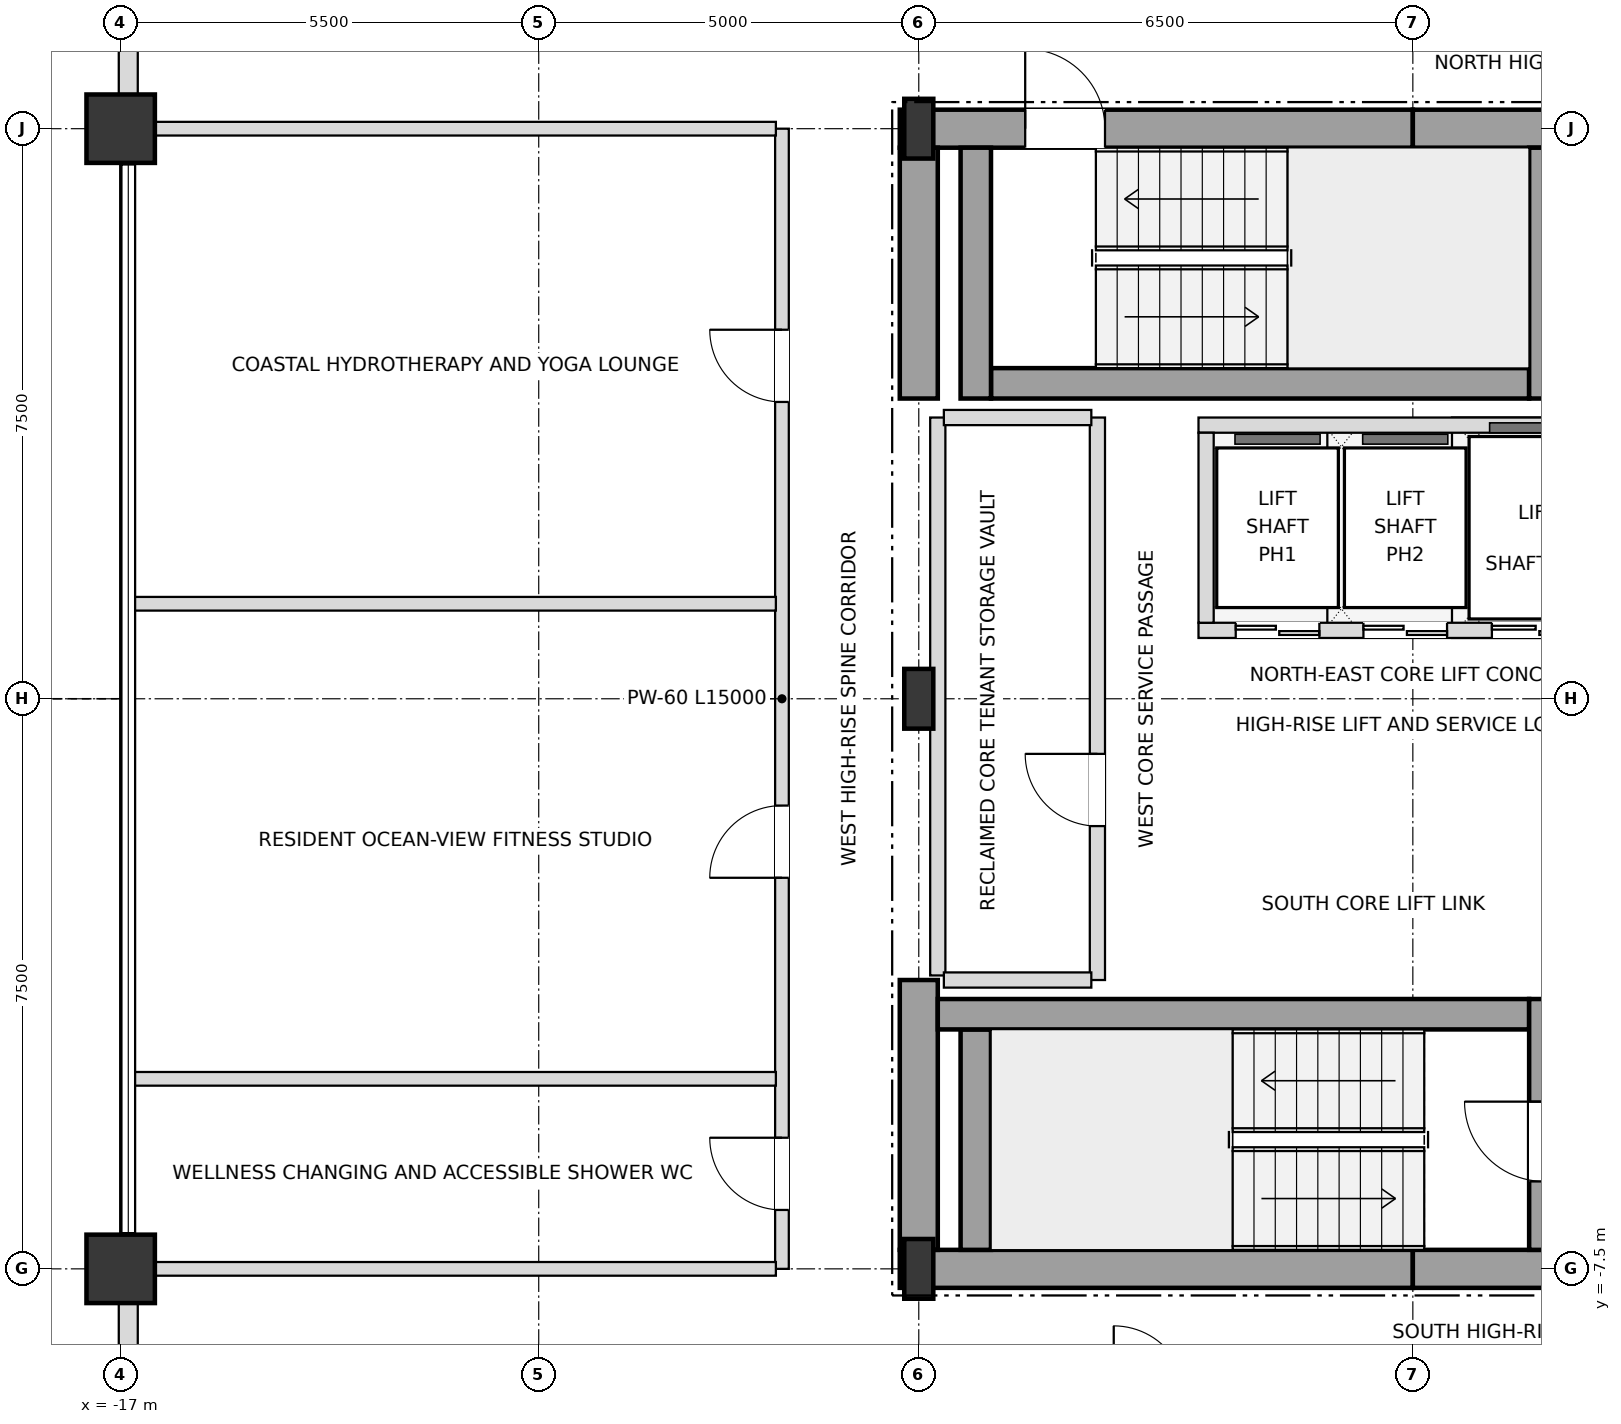
"""IFC4 building model, lengths in metres.
Left out: names, types, materials, properties, quantities, classifications, styles, units other than length and angle.
Written with IfcOpenShell. Run it as: python <this file> out.ifc"""

import sys

from ifc_helpers import new_model, si_unit, direction, frame, frame_2d, origin, origin_2d, place, context, subcontext, project, spatial, rectangle, i_section, extrude, element, fill, save


model = new_model("IFC4")
c1 = context("Model", 3, precision=1e-05, world=origin(), true_north=direction((0.0, 1.0)))
c2 = subcontext(c1, "Body", "Model", "MODEL_VIEW")
j1 = project(units=[si_unit("LENGTHUNIT", "METRE"), si_unit("PLANEANGLEUNIT", "RADIAN")], contexts=[c1])
p1 = place(None, origin())
s1 = spatial("IfcSite", under=j1, at=p1, CompositionType="ELEMENT")
p2 = place(p1, origin())
s2 = spatial("IfcBuilding", under=s1, at=p2, CompositionType="ELEMENT")
p3 = place(p2, frame((0.0, 0.0, 283.5)))
s3 = spatial("IfcBuildingStorey", under=s2, at=p3, CompositionType="ELEMENT", Elevation=283.5)
for number, where, z_axis, x_axis in (
    (1, (-6.5, -7.5, 0.0), (0.0, 0.0, 1.0), (1.0, 0.0, 0.0)),
    (2, (-6.5, 0.0, 0.0), (0.0, 0.0, 1.0), (1.0, 0.0, 0.0)),
    (3, (-6.5, 7.5, 0.0), (0.0, 0.0, 1.0), (1.0, 0.0, 0.0)),
):
    element("IfcColumn", number, at=place(p3, frame(where, z_axis=z_axis, x_axis=x_axis)), inside=s3, PredefinedType="COLUMN", context=c2, shape_type="SweptSolid", body=[
        extrude(i_section(OverallWidth=0.382, OverallDepth=0.786, WebThickness=0.02, FlangeThickness=0.033, at=origin_2d()), origin(), (0.0, 0.0, 1.0), 3.6),
    ])
for number, where, z_axis, x_axis in (
    (4, (-17.0, 7.5, 0.0), (0.0, 0.0, 1.0), (1.0, 0.0, 0.0)),
    (5, (-17.0, -7.5, 0.0), (0.0, 0.0, 1.0), (1.0, 0.0, 0.0)),
):
    element("IfcColumn", number, at=place(p3, frame(where, z_axis=z_axis, x_axis=x_axis)), inside=s3, PredefinedType="USERDEFINED", context=c2, shape_type="SweptSolid", body=[
        extrude(rectangle(XDim=0.9, YDim=0.9, at=origin_2d()), origin(), (0.0, 0.0, 1.0), 3.6),
    ])
p4 = place(p3, frame((-16.9, 12.555, 0.0), z_axis=(0.0, 0.0, 1.0), x_axis=(0.0, -1.0, 0.0)))
e6 = element("IfcWall", 6, at=p4, inside=s3, PredefinedType="SOLIDWALL", context=c2, shape_type="SweptSolid", body=[
    extrude(rectangle(XDim=4.61, YDim=0.25, at=frame_2d((2.305, 0.0))), origin(), (0.0, 0.0, 1.0), 2.748),
])
p5 = place(p4, frame((1.405, 0.0, 0.72)))
e7 = element("IfcOpeningElement", 7, at=p5, cuts=e6, PredefinedType="OPENING", context=c2, shape_type="SweptSolid", body=[
    extrude(rectangle(XDim=1.8, YDim=1.68, at=frame_2d((0.9, 0.84))), frame((0.0, 0.135, 0.0), z_axis=(0.0, -1.0, 0.0), x_axis=(1.0, 0.0, 0.0)), (0.0, 0.0, 1.0), 0.27),
])
p6 = place(p3, frame((-16.9, -7.945, 0.0), z_axis=(0.0, 0.0, 1.0), x_axis=(0.0, -1.0, 0.0)))
e8 = element("IfcWall", 8, at=p6, inside=s3, PredefinedType="SOLIDWALL", context=c2, shape_type="SweptSolid", body=[
    extrude(rectangle(XDim=4.61, YDim=0.25, at=frame_2d((2.305, 0.0))), origin(), (0.0, 0.0, 1.0), 2.748),
])
p7 = place(p6, frame((1.405, 0.0, 0.72)))
e9 = element("IfcOpeningElement", 9, at=p7, cuts=e8, PredefinedType="OPENING", context=c2, shape_type="SweptSolid", body=[
    extrude(rectangle(XDim=1.8, YDim=1.68, at=frame_2d((0.9, 0.84))), frame((0.0, 0.135, 0.0), z_axis=(0.0, -1.0, 0.0), x_axis=(1.0, 0.0, 0.0)), (0.0, 0.0, 1.0), 0.27),
])
for number, where, z_axis, x_axis in (
    (10, (-6.75, -7.5, 0.0), (0.0, 0.0, 1.0), (1.0, 0.0, 0.0)),
    (11, (0.0, -7.5, 0.0), (0.0, 0.0, 1.0), (1.0, 0.0, 0.0)),
):
    element("IfcWall", number, at=place(p3, frame(where, z_axis=z_axis, x_axis=x_axis)), inside=s3, PredefinedType="SHEAR", context=c2, shape_type="SweptSolid", body=[
        extrude(rectangle(XDim=6.75, YDim=0.5, at=frame_2d((3.375, 0.0))), origin(), (0.0, 0.0, 1.0), 3.38),
    ])
p8 = place(p3, frame((-6.75, 7.5, 0.0), z_axis=(0.0, 0.0, 1.0), x_axis=(1.0, 0.0, 0.0)))
e12 = element("IfcWall", 12, at=p8, inside=s3, PredefinedType="SHEAR", context=c2, shape_type="SweptSolid", body=[
    extrude(rectangle(XDim=6.75, YDim=0.5, at=frame_2d((3.375, 0.0))), origin(), (0.0, 0.0, 1.0), 3.38),
])
p9 = place(p8, frame((1.65, 0.0, 0.0)))
e13 = element("IfcOpeningElement", 13, at=p9, cuts=e12, PredefinedType="OPENING", context=c2, shape_type="SweptSolid", body=[
    extrude(rectangle(XDim=1.05, YDim=2.15, at=frame_2d((0.525, 1.075))), frame((0.0, 0.26, 0.0), z_axis=(0.0, -1.0, 0.0), x_axis=(1.0, 0.0, 0.0)), (0.0, 0.0, 1.0), 0.52),
])
p10 = place(p3, frame((0.0, 7.5, 0.0), z_axis=(0.0, 0.0, 1.0), x_axis=(1.0, 0.0, 0.0)))
e14 = element("IfcWall", 14, at=p10, inside=s3, PredefinedType="SHEAR", context=c2, shape_type="SweptSolid", body=[
    extrude(rectangle(XDim=2.08, YDim=0.5, at=frame_2d((1.04, 0.0))), origin(), (0.0, 0.0, 1.0), 3.38),
])
p11 = place(p3, frame((-6.5, -7.25, 0.0), z_axis=(0.0, 0.0, 1.0), x_axis=(0.0, 1.0, 0.0)))
e15 = element("IfcWall", 15, at=p11, inside=s3, PredefinedType="SHEAR", context=c2, shape_type="SweptSolid", body=[
    extrude(rectangle(XDim=3.55, YDim=0.5, at=frame_2d((1.775, 0.0))), origin(), (0.0, 0.0, 1.0), 3.38),
])
p12 = place(p3, frame((-6.5, 3.95, 0.0), z_axis=(0.0, 0.0, 1.0), x_axis=(0.0, 1.0, 0.0)))
e16 = element("IfcWall", 16, at=p12, inside=s3, PredefinedType="SHEAR", context=c2, shape_type="SweptSolid", body=[
    extrude(rectangle(XDim=3.3, YDim=0.5, at=frame_2d((1.65, 0.0))), origin(), (0.0, 0.0, 1.0), 3.38),
])
p13 = place(p3, frame((-5.75, -7.25, 0.0), z_axis=(0.0, 0.0, 1.0), x_axis=(0.0, 1.0, 0.0)))
e17 = element("IfcWall", 17, at=p13, inside=s3, PredefinedType="SHEAR", context=c2, shape_type="SweptSolid", body=[
    extrude(rectangle(XDim=2.9, YDim=0.4, at=frame_2d((1.45, 0.0))), origin(), (0.0, 0.0, 1.0), 3.38),
])
p14 = place(p3, frame((-6.25, -4.15, 0.0), z_axis=(0.0, 0.0, 1.0), x_axis=(1.0, 0.0, 0.0)))
e18 = element("IfcWall", 18, at=p14, inside=s3, PredefinedType="SHEAR", context=c2, shape_type="SweptSolid", body=[
    extrude(rectangle(XDim=7.78, YDim=0.4, at=frame_2d((3.89, 0.0))), origin(), (0.0, 0.0, 1.0), 3.38),
])
p15 = place(p3, frame((1.73, -7.25, 0.0), z_axis=(0.0, 0.0, 1.0), x_axis=(0.0, 1.0, 0.0)))
e19 = element("IfcWall", 19, at=p15, inside=s3, PredefinedType="SHEAR", context=c2, shape_type="SweptSolid", body=[
    extrude(rectangle(XDim=3.3, YDim=0.4, at=frame_2d((1.65, 0.0))), origin(), (0.0, 0.0, 1.0), 3.38),
])
p16 = place(p15, frame((0.9, 0.0, 0.0)))
e20 = element("IfcOpeningElement", 20, at=p16, cuts=e19, PredefinedType="OPENING", context=c2, shape_type="SweptSolid", body=[
    extrude(rectangle(XDim=1.05, YDim=2.15, at=frame_2d((0.525, 1.075))), frame((0.0, 0.21, 0.0), z_axis=(0.0, -1.0, 0.0), x_axis=(1.0, 0.0, 0.0)), (0.0, 0.0, 1.0), 0.42),
])
p17 = place(p3, frame((-5.55, 4.15, 0.0), z_axis=(0.0, 0.0, 1.0), x_axis=(1.0, 0.0, 0.0)))
e21 = element("IfcWall", 21, at=p17, inside=s3, PredefinedType="SHEAR", context=c2, shape_type="SweptSolid", body=[
    extrude(rectangle(XDim=7.08, YDim=0.4, at=frame_2d((3.54, 0.0))), origin(), (0.0, 0.0, 1.0), 3.38),
])
for number, where, z_axis, x_axis in (
    (22, (1.73, 3.95, 0.0), (0.0, 0.0, 1.0), (0.0, 1.0, 0.0)),
    (23, (-5.75, 3.95, 0.0), (0.0, 0.0, 1.0), (0.0, 1.0, 0.0)),
):
    element("IfcWall", number, at=place(p3, frame(where, z_axis=z_axis, x_axis=x_axis)), inside=s3, PredefinedType="SHEAR", context=c2, shape_type="SweptSolid", body=[
        extrude(rectangle(XDim=3.3, YDim=0.4, at=frame_2d((1.65, 0.0))), origin(), (0.0, 0.0, 1.0), 3.38),
    ])
p18 = place(p3, frame((-2.82, 0.9, 0.0), z_axis=(0.0, 0.0, 1.0), x_axis=(1.0, 0.0, 0.0)))
e24 = element("IfcWall", 24, at=p18, inside=s3, PredefinedType="SOLIDWALL", context=c2, shape_type="SweptSolid", body=[
    extrude(rectangle(XDim=5.58, YDim=0.2, at=frame_2d((2.79, 0.0))), origin(), (0.0, 0.0, 1.0), 3.38),
])
p19 = place(p18, frame((0.49, 0.0, 0.0)))
e25 = element("IfcOpeningElement", 25, at=p19, cuts=e24, PredefinedType="OPENING", context=c2, shape_type="SweptSolid", body=[
    extrude(rectangle(XDim=1.1, YDim=2.15, at=frame_2d((0.55, 1.075))), frame((0.0, 0.11, 0.0), z_axis=(0.0, -1.0, 0.0), x_axis=(1.0, 0.0, 0.0)), (0.0, 0.0, 1.0), 0.22),
])
p20 = place(p18, frame((2.17, 0.0, 0.0)))
e26 = element("IfcOpeningElement", 26, at=p20, cuts=e24, PredefinedType="OPENING", context=c2, shape_type="SweptSolid", body=[
    extrude(rectangle(XDim=1.1, YDim=2.15, at=frame_2d((0.55, 1.075))), frame((0.0, 0.11, 0.0), z_axis=(0.0, -1.0, 0.0), x_axis=(1.0, 0.0, 0.0)), (0.0, 0.0, 1.0), 0.22),
])
p21 = place(p18, frame((3.86, 0.0, 0.0)))
e27 = element("IfcOpeningElement", 27, at=p21, cuts=e24, PredefinedType="OPENING", context=c2, shape_type="SweptSolid", body=[
    extrude(rectangle(XDim=1.2, YDim=2.2, at=frame_2d((0.6, 1.1))), frame((0.0, 0.11, 0.0), z_axis=(0.0, -1.0, 0.0), x_axis=(1.0, 0.0, 0.0)), (0.0, 0.0, 1.0), 0.22),
])
p22 = place(p3, frame((-2.82, 3.6, 0.0), z_axis=(0.0, 0.0, 1.0), x_axis=(1.0, 0.0, 0.0)))
e28 = element("IfcWall", 28, at=p22, inside=s3, PredefinedType="SOLIDWALL", context=c2, shape_type="SweptSolid", body=[
    extrude(rectangle(XDim=5.58, YDim=0.2, at=frame_2d((2.79, 0.0))), origin(), (0.0, 0.0, 1.0), 3.38),
])
p23 = place(p3, frame((-2.72, 1.0, 0.0), z_axis=(0.0, 0.0, 1.0), x_axis=(0.0, 1.0, 0.0)))
e29 = element("IfcWall", 29, at=p23, inside=s3, PredefinedType="SOLIDWALL", context=c2, shape_type="SweptSolid", body=[
    extrude(rectangle(XDim=2.5, YDim=0.2, at=frame_2d((1.25, 0.0))), origin(), (0.0, 0.0, 1.0), 3.38),
])
p24 = place(p3, frame((-8.3, -7.5, 0.0), z_axis=(0.0, 0.0, 1.0), x_axis=(0.0, 1.0, 0.0)))
e30 = element("IfcWall", 30, at=p24, inside=s3, PredefinedType="PARTITIONING", context=c2, shape_type="SweptSolid", body=[
    extrude(rectangle(XDim=15.0, YDim=0.18, at=frame_2d((7.5, 0.0))), origin(), (0.0, 0.0, 1.0), 3.38),
])
p25 = place(p24, frame((0.775, 0.0, 0.0)))
e31 = element("IfcOpeningElement", 31, at=p25, cuts=e30, PredefinedType="OPENING", context=c2, shape_type="SweptSolid", body=[
    extrude(rectangle(XDim=0.95, YDim=2.15, at=frame_2d((0.475, 1.075))), frame((0.0, 0.1, 0.0), z_axis=(0.0, -1.0, 0.0), x_axis=(1.0, 0.0, 0.0)), (0.0, 0.0, 1.0), 0.2),
])
p26 = place(p24, frame((5.145, 0.0, 0.0)))
e32 = element("IfcOpeningElement", 32, at=p26, cuts=e30, PredefinedType="OPENING", context=c2, shape_type="SweptSolid", body=[
    extrude(rectangle(XDim=0.95, YDim=2.15, at=frame_2d((0.475, 1.075))), frame((0.0, 0.1, 0.0), z_axis=(0.0, -1.0, 0.0), x_axis=(1.0, 0.0, 0.0)), (0.0, 0.0, 1.0), 0.2),
])
p27 = place(p24, frame((11.405, 0.0, 0.0)))
e33 = element("IfcOpeningElement", 33, at=p27, cuts=e30, PredefinedType="OPENING", context=c2, shape_type="SweptSolid", body=[
    extrude(rectangle(XDim=0.95, YDim=2.15, at=frame_2d((0.475, 1.075))), frame((0.0, 0.1, 0.0), z_axis=(0.0, -1.0, 0.0), x_axis=(1.0, 0.0, 0.0)), (0.0, 0.0, 1.0), 0.2),
])
p28 = place(p3, frame((-6.25, -3.64, 0.0), z_axis=(0.0, 0.0, 1.0), x_axis=(0.0, 1.0, 0.0)))
e34 = element("IfcWall", 34, at=p28, inside=s3, PredefinedType="SOLIDWALL", context=c2, shape_type="SweptSolid", body=[
    extrude(rectangle(XDim=7.34, YDim=0.2, at=frame_2d((3.67, 0.0))), origin(), (0.0, 0.0, 1.0), 3.38),
])
p29 = place(p3, frame((-4.15, -3.7, 0.0), z_axis=(0.0, 0.0, 1.0), x_axis=(0.0, 1.0, 0.0)))
e35 = element("IfcWall", 35, at=p29, inside=s3, PredefinedType="SOLIDWALL", context=c2, shape_type="SweptSolid", body=[
    extrude(rectangle(XDim=7.4, YDim=0.2, at=frame_2d((3.7, 0.0))), origin(), (0.0, 0.0, 1.0), 3.38),
])
p30 = place(p29, frame((2.025, 0.0, 0.0)))
e36 = element("IfcOpeningElement", 36, at=p30, cuts=e35, PredefinedType="OPENING", context=c2, shape_type="SweptSolid", body=[
    extrude(rectangle(XDim=0.95, YDim=2.15, at=frame_2d((0.475, 1.075))), frame((0.0, 0.11, 0.0), z_axis=(0.0, -1.0, 0.0), x_axis=(1.0, 0.0, 0.0)), (0.0, 0.0, 1.0), 0.22),
])
p31 = place(p3, frame((-16.9, -7.5, 0.0), z_axis=(0.0, 0.0, 1.0), x_axis=(1.0, 0.0, 0.0)))
e37 = element("IfcWall", 37, at=p31, inside=s3, PredefinedType="PARTITIONING", context=c2, shape_type="SweptSolid", body=[
    extrude(rectangle(XDim=8.52, YDim=0.18, at=frame_2d((4.26, 0.0))), origin(), (0.0, 0.0, 1.0), 2.826),
])
p32 = place(p3, frame((-16.82, -5.0, 0.0), z_axis=(0.0, 0.0, 1.0), x_axis=(1.0, 0.0, 0.0)))
e38 = element("IfcWall", 38, at=p32, inside=s3, PredefinedType="PARTITIONING", context=c2, shape_type="SweptSolid", body=[
    extrude(rectangle(XDim=8.44, YDim=0.18, at=frame_2d((4.22, 0.0))), origin(), (0.0, 0.0, 1.0), 3.018),
])
p33 = place(p3, frame((-6.17, -3.7, 0.0), z_axis=(0.0, 0.0, 1.0), x_axis=(1.0, 0.0, 0.0)))
e39 = element("IfcWall", 39, at=p33, inside=s3, PredefinedType="SOLIDWALL", context=c2, shape_type="SweptSolid", body=[
    extrude(rectangle(XDim=1.94, YDim=0.2, at=frame_2d((0.97, 0.0))), origin(), (0.0, 0.0, 1.0), 3.38),
])
p34 = place(p3, frame((-16.82, 1.25, 0.0), z_axis=(0.0, 0.0, 1.0), x_axis=(1.0, 0.0, 0.0)))
e40 = element("IfcWall", 40, at=p34, inside=s3, PredefinedType="PARTITIONING", context=c2, shape_type="SweptSolid", body=[
    extrude(rectangle(XDim=8.44, YDim=0.18, at=frame_2d((4.22, 0.0))), origin(), (0.0, 0.0, 1.0), 3.018),
])
p35 = place(p3, frame((-6.17, 3.7, 0.0), z_axis=(0.0, 0.0, 1.0), x_axis=(1.0, 0.0, 0.0)))
e41 = element("IfcWall", 41, at=p35, inside=s3, PredefinedType="SOLIDWALL", context=c2, shape_type="SweptSolid", body=[
    extrude(rectangle(XDim=1.94, YDim=0.2, at=frame_2d((0.97, 0.0))), origin(), (0.0, 0.0, 1.0), 3.38),
])
p36 = place(p3, frame((-16.9, 7.5, 0.0), z_axis=(0.0, 0.0, 1.0), x_axis=(1.0, 0.0, 0.0)))
e42 = element("IfcWall", 42, at=p36, inside=s3, PredefinedType="PARTITIONING", context=c2, shape_type="SweptSolid", body=[
    extrude(rectangle(XDim=8.52, YDim=0.18, at=frame_2d((4.26, 0.0))), origin(), (0.0, 0.0, 1.0), 2.826),
])
p37 = place(p9, origin())
e43 = element("IfcDoor", 43, at=p37, inside=s3, OperationType="SINGLE_SWING_LEFT", PredefinedType="DOOR", context=c2, shape_type="SweptSolid", body=[
    extrude(rectangle(XDim=1.05, YDim=2.15, at=frame_2d((0.525, 1.075))), frame((0.0, 0.025, 0.0), z_axis=(0.0, -1.0, 0.0), x_axis=(1.0, 0.0, 0.0)), (0.0, 0.0, 1.0), 0.05),
])
fill(e13, e43)
p38 = place(p19, origin())
e44 = element("IfcDoor", 44, at=p38, inside=s3, OperationType="DOUBLE_DOOR_SLIDING", PredefinedType="DOOR", context=c2, shape_type="SweptSolid", body=[
    extrude(rectangle(XDim=1.1, YDim=2.15, at=frame_2d((0.55, 1.075))), frame((0.0, 0.025, 0.0), z_axis=(0.0, -1.0, 0.0), x_axis=(1.0, 0.0, 0.0)), (0.0, 0.0, 1.0), 0.05),
])
fill(e25, e44)
p39 = place(p20, origin())
e45 = element("IfcDoor", 45, at=p39, inside=s3, OperationType="DOUBLE_DOOR_SLIDING", PredefinedType="DOOR", context=c2, shape_type="SweptSolid", body=[
    extrude(rectangle(XDim=1.1, YDim=2.15, at=frame_2d((0.55, 1.075))), frame((0.0, 0.025, 0.0), z_axis=(0.0, -1.0, 0.0), x_axis=(1.0, 0.0, 0.0)), (0.0, 0.0, 1.0), 0.05),
])
fill(e26, e45)
p40 = place(p21, origin())
e46 = element("IfcDoor", 46, at=p40, inside=s3, OperationType="DOUBLE_DOOR_SLIDING", PredefinedType="DOOR", context=c2, shape_type="SweptSolid", body=[
    extrude(rectangle(XDim=1.2, YDim=2.2, at=frame_2d((0.6, 1.1))), frame((0.0, 0.025, 0.0), z_axis=(0.0, -1.0, 0.0), x_axis=(1.0, 0.0, 0.0)), (0.0, 0.0, 1.0), 0.05),
])
fill(e27, e46)
p41 = place(p30, origin())
e47 = element("IfcDoor", 47, at=p41, inside=s3, OperationType="SINGLE_SWING_RIGHT", PredefinedType="DOOR", context=c2, shape_type="SweptSolid", body=[
    extrude(rectangle(XDim=0.95, YDim=2.15, at=frame_2d((0.475, 1.075))), frame((0.0, 0.025, 0.0), z_axis=(0.0, -1.0, 0.0), x_axis=(1.0, 0.0, 0.0)), (0.0, 0.0, 1.0), 0.05),
])
fill(e36, e47)
p42 = place(p25, origin())
e48 = element("IfcDoor", 48, at=p42, inside=s3, OperationType="SINGLE_SWING_RIGHT", PredefinedType="DOOR", context=c2, shape_type="SweptSolid", body=[
    extrude(rectangle(XDim=0.95, YDim=2.15, at=frame_2d((0.475, 1.075))), frame((0.0, 0.025, 0.0), z_axis=(0.0, -1.0, 0.0), x_axis=(1.0, 0.0, 0.0)), (0.0, 0.0, 1.0), 0.05),
])
fill(e31, e48)
p43 = place(p26, origin())
e49 = element("IfcDoor", 49, at=p43, inside=s3, OperationType="SINGLE_SWING_LEFT", PredefinedType="DOOR", context=c2, shape_type="SweptSolid", body=[
    extrude(rectangle(XDim=0.95, YDim=2.15, at=frame_2d((0.475, 1.075))), frame((0.0, 0.025, 0.0), z_axis=(0.0, -1.0, 0.0), x_axis=(1.0, 0.0, 0.0)), (0.0, 0.0, 1.0), 0.05),
])
fill(e32, e49)
p44 = place(p27, origin())
e50 = element("IfcDoor", 50, at=p44, inside=s3, OperationType="SINGLE_SWING_RIGHT", PredefinedType="DOOR", context=c2, shape_type="SweptSolid", body=[
    extrude(rectangle(XDim=0.95, YDim=2.15, at=frame_2d((0.475, 1.075))), frame((0.0, 0.025, 0.0), z_axis=(0.0, -1.0, 0.0), x_axis=(1.0, 0.0, 0.0)), (0.0, 0.0, 1.0), 0.05),
])
fill(e33, e50)
save(model, sys.argv[1])
